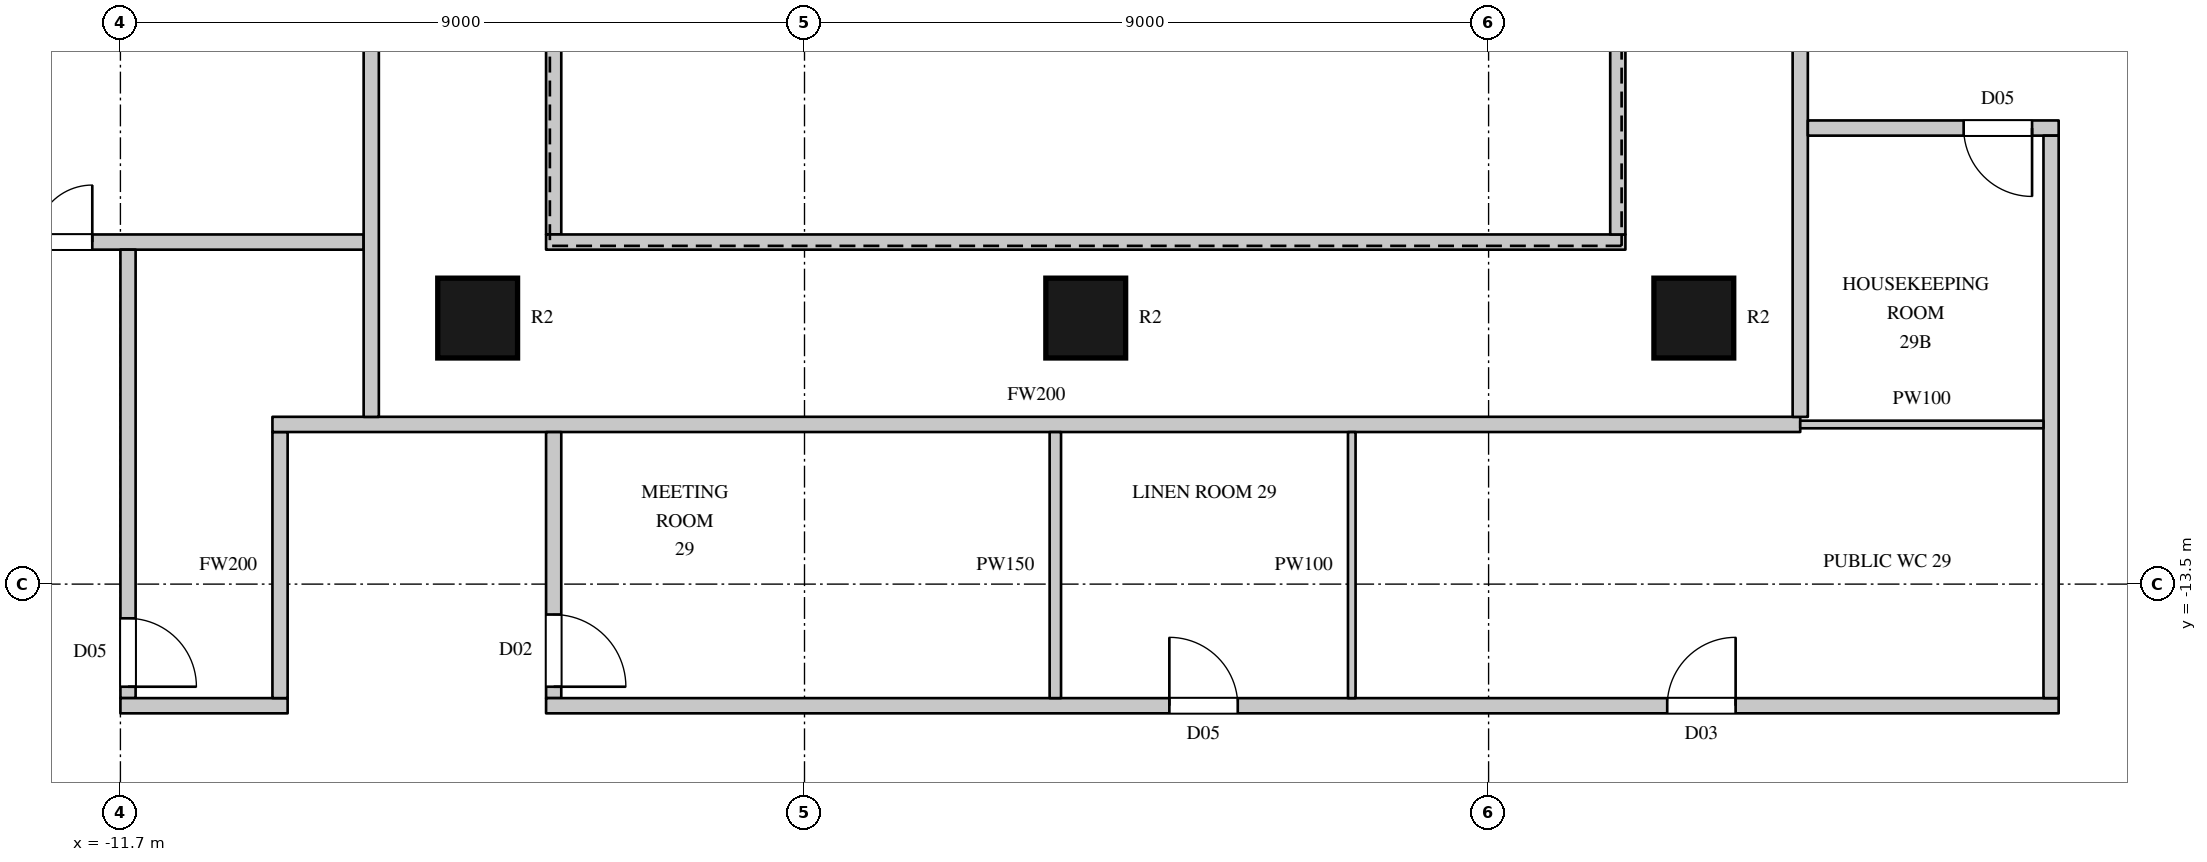
"""IFC4 building model, lengths in metres.
Left out: names, types, materials, properties, quantities, classifications, styles, units other than length and angle.
Written with IfcOpenShell. Run it as: python <this file> out.ifc"""

import sys

from ifc_helpers import new_model, si_unit, direction, frame, frame_2d, origin, origin_2d, place, context, subcontext, project, spatial, rectangle, circle, extrude, element, fill, save


model = new_model("IFC4")
c1 = context("Model", 3, precision=1e-05, world=origin(), true_north=direction((0.0, 1.0)))
c2 = subcontext(c1, "Body", "Model", "MODEL_VIEW")
j1 = project(units=[si_unit("LENGTHUNIT", "METRE"), si_unit("PLANEANGLEUNIT", "RADIAN")], contexts=[c1])
p1 = place(None, origin())
s1 = spatial("IfcSite", under=j1, at=p1, CompositionType="ELEMENT")
p2 = place(p1, origin())
s2 = spatial("IfcBuilding", under=s1, at=p2, CompositionType="ELEMENT")
p3 = place(p2, frame((0.0, 0.0, 134.7)))
s3 = spatial("IfcBuildingStorey", under=s2, at=p3, CompositionType="ELEMENT", Elevation=134.7)
for number, where, z_axis, x_axis in (
    (1, (-7.0, -10.0, 0.0), (0.0, 0.0, 1.0), (1.0, 0.0, 0.0)),
    (2, (1.0, -10.0, 0.0), (0.0, 0.0, 1.0), (1.0, 0.0, 0.0)),
    (3, (9.0, -10.0, 0.0), (0.0, 0.0, 1.0), (1.0, 0.0, 0.0)),
):
    element("IfcColumn", number, at=place(p3, frame(where, z_axis=z_axis, x_axis=x_axis)), inside=s3, PredefinedType="COLUMN", context=c2, shape_type="SweptSolid", body=[
        extrude(circle(Radius=0.525, at=origin_2d()), origin(), (0.0, 0.0, 1.0), 3.6),
    ])
p4 = place(p3, frame((-13.97, -9.0, 0.0), z_axis=(0.0, 0.0, 1.0), x_axis=(1.0, 0.0, 0.0)))
e4 = element("IfcWall", 4, at=p4, inside=s3, PredefinedType="PARTITIONING", context=c2, shape_type="SweptSolid", body=[
    extrude(rectangle(XDim=5.47, YDim=0.2, at=frame_2d((2.735, 0.0))), origin(), (0.0, 0.0, 1.0), 3.3),
])
p5 = place(p4, frame((0.4, 0.0, 0.0)))
e5 = element("IfcOpeningElement", 5, at=p5, cuts=e4, PredefinedType="OPENING", context=c2, shape_type="SweptSolid", body=[
    extrude(rectangle(XDim=1.5, YDim=2.2, at=frame_2d((0.75, 1.1))), frame((0.0, 0.11, 0.0), z_axis=(0.0, -1.0, 0.0), x_axis=(1.0, 0.0, 0.0)), (0.0, 0.0, 1.0), 0.22),
])
p6 = place(p3, frame((-11.6, -15.0, 0.0), z_axis=(0.0, 0.0, 1.0), x_axis=(0.0, 1.0, 0.0)))
e6 = element("IfcWall", 6, at=p6, inside=s3, PredefinedType="PARTITIONING", context=c2, shape_type="SweptSolid", body=[
    extrude(rectangle(XDim=5.9, YDim=0.2, at=frame_2d((2.95, 0.0))), origin(), (0.0, 0.0, 1.0), 2.6),
])
p7 = place(p6, frame((0.15, 0.0, 0.0)))
e7 = element("IfcOpeningElement", 7, at=p7, cuts=e6, PredefinedType="OPENING", context=c2, shape_type="SweptSolid", body=[
    extrude(rectangle(XDim=0.9, YDim=2.2, at=frame_2d((0.45, 1.1))), frame((0.0, 0.11, 0.0), z_axis=(0.0, -1.0, 0.0), x_axis=(1.0, 0.0, 0.0)), (0.0, 0.0, 1.0), 0.22),
])
p8 = place(p3, frame((-11.7, -15.1, 0.0), z_axis=(0.0, 0.0, 1.0), x_axis=(1.0, 0.0, 0.0)))
e8 = element("IfcWall", 8, at=p8, inside=s3, PredefinedType="PARTITIONING", context=c2, shape_type="SweptSolid", body=[
    extrude(rectangle(XDim=2.2, YDim=0.2, at=frame_2d((1.1, 0.0))), origin(), (0.0, 0.0, 1.0), 3.3),
])
p9 = place(p3, frame((-9.6, -15.0, 0.0), z_axis=(0.0, 0.0, 1.0), x_axis=(0.0, 1.0, 0.0)))
e9 = element("IfcWall", 9, at=p9, inside=s3, PredefinedType="PARTITIONING", context=c2, shape_type="SweptSolid", body=[
    extrude(rectangle(XDim=3.501, YDim=0.2, at=frame_2d((1.75, 0.0))), origin(), (0.0, 0.0, 1.0), 3.3),
])
p10 = place(p3, frame((-9.7, -11.399, 0.0), z_axis=(0.0, 0.0, 1.0), x_axis=(1.0, 0.0, 0.0)))
e10 = element("IfcWall", 10, at=p10, inside=s3, PredefinedType="PARTITIONING", context=c2, shape_type="SweptSolid", body=[
    extrude(rectangle(XDim=20.1, YDim=0.2, at=frame_2d((10.05, 0.0))), origin(), (0.0, 0.0, 1.0), 3.3),
])
p11 = place(p3, frame((-8.4, -11.3, 0.0), z_axis=(0.0, 0.0, 1.0), x_axis=(0.0, 1.0, 0.0)))
e11 = element("IfcWall", 11, at=p11, inside=s3, PredefinedType="PARTITIONING", context=c2, shape_type="SweptSolid", body=[
    extrude(rectangle(XDim=22.7, YDim=0.2, at=frame_2d((11.35, 0.0))), origin(), (0.0, 0.0, 1.0), 3.3),
])
p12 = place(p11, frame((15.05, 0.0, 0.0)))
e12 = element("IfcOpeningElement", 12, at=p12, cuts=e11, PredefinedType="OPENING", context=c2, shape_type="SweptSolid", body=[
    extrude(rectangle(XDim=1.5, YDim=2.2, at=frame_2d((0.75, 1.1))), frame((0.0, 0.11, 0.0), z_axis=(0.0, -1.0, 0.0), x_axis=(1.0, 0.0, 0.0)), (0.0, 0.0, 1.0), 0.22),
])
p13 = place(p3, frame((-6.0, -15.0, 0.0), z_axis=(0.0, 0.0, 1.0), x_axis=(0.0, 1.0, 0.0)))
e13 = element("IfcWall", 13, at=p13, inside=s3, PredefinedType="PARTITIONING", context=c2, shape_type="SweptSolid", body=[
    extrude(rectangle(XDim=3.5, YDim=0.2, at=frame_2d((1.75, 0.0))), origin(), (0.0, 0.0, 1.0), 3.3),
])
p14 = place(p13, frame((0.15, 0.0, 0.0)))
e14 = element("IfcOpeningElement", 14, at=p14, cuts=e13, PredefinedType="OPENING", context=c2, shape_type="SweptSolid", body=[
    extrude(rectangle(XDim=0.95, YDim=2.2, at=frame_2d((0.475, 1.1))), frame((0.0, 0.11, 0.0), z_axis=(0.0, -1.0, 0.0), x_axis=(1.0, 0.0, 0.0)), (0.0, 0.0, 1.0), 0.22),
])
p15 = place(p3, frame((-6.1, -15.1, 0.0), z_axis=(0.0, 0.0, 1.0), x_axis=(1.0, 0.0, 0.0)))
e15 = element("IfcWall", 15, at=p15, inside=s3, PredefinedType="PARTITIONING", context=c2, shape_type="SweptSolid", body=[
    extrude(rectangle(XDim=19.9, YDim=0.2, at=frame_2d((9.95, 0.0))), origin(), (0.0, 0.0, 1.0), 3.3),
])
p16 = place(p15, frame((8.2, 0.0, 0.0)))
e16 = element("IfcOpeningElement", 16, at=p16, cuts=e15, PredefinedType="OPENING", context=c2, shape_type="SweptSolid", body=[
    extrude(rectangle(XDim=0.9, YDim=2.2, at=frame_2d((0.45, 1.1))), frame((0.0, 0.11, 0.0), z_axis=(0.0, -1.0, 0.0), x_axis=(1.0, 0.0, 0.0)), (0.0, 0.0, 1.0), 0.22),
])
p17 = place(p15, frame((14.75, 0.0, 0.0)))
e17 = element("IfcOpeningElement", 17, at=p17, cuts=e15, PredefinedType="OPENING", context=c2, shape_type="SweptSolid", body=[
    extrude(rectangle(XDim=0.9, YDim=2.2, at=frame_2d((0.45, 1.1))), frame((0.0, 0.11, 0.0), z_axis=(0.0, -1.0, 0.0), x_axis=(1.0, 0.0, 0.0)), (0.0, 0.0, 1.0), 0.22),
])
p18 = place(p3, frame((-6.0, -8.9, 0.0), z_axis=(0.0, 0.0, 1.0), x_axis=(0.0, 1.0, 0.0)))
e18 = element("IfcWall", 18, at=p18, inside=s3, PredefinedType="PARTITIONING", context=c2, shape_type="SweptSolid", body=[
    extrude(rectangle(XDim=17.8, YDim=0.2, at=frame_2d((8.9, 0.0))), origin(), (0.0, 0.0, 1.0), 3.3),
])
p19 = place(p3, frame((-6.1, -9.0, 0.0), z_axis=(0.0, 0.0, 1.0), x_axis=(1.0, 0.0, 0.0)))
e19 = element("IfcWall", 19, at=p19, inside=s3, PredefinedType="PARTITIONING", context=c2, shape_type="SweptSolid", body=[
    extrude(rectangle(XDim=14.2, YDim=0.2, at=frame_2d((7.1, 0.0))), origin(), (0.0, 0.0, 1.0), 3.3),
])
p20 = place(p3, frame((8.0, -8.9, 0.0), z_axis=(0.0, 0.0, 1.0), x_axis=(0.0, 1.0, 0.0)))
e20 = element("IfcWall", 20, at=p20, inside=s3, PredefinedType="PARTITIONING", context=c2, shape_type="SweptSolid", body=[
    extrude(rectangle(XDim=17.8, YDim=0.2, at=frame_2d((8.9, 0.0))), origin(), (0.0, 0.0, 1.0), 3.3),
])
p21 = place(p3, frame((10.4, -11.3, 0.0), z_axis=(0.0, 0.0, 1.0), x_axis=(0.0, 1.0, 0.0)))
e21 = element("IfcWall", 21, at=p21, inside=s3, PredefinedType="PARTITIONING", context=c2, shape_type="SweptSolid", body=[
    extrude(rectangle(XDim=22.6, YDim=0.2, at=frame_2d((11.3, 0.0))), origin(), (0.0, 0.0, 1.0), 3.3),
])
p22 = place(p21, frame((16.3, 0.0, 0.0)))
e22 = element("IfcOpeningElement", 22, at=p22, cuts=e21, PredefinedType="OPENING", context=c2, shape_type="SweptSolid", body=[
    extrude(rectangle(XDim=1.5, YDim=2.2, at=frame_2d((0.75, 1.1))), frame((0.0, 0.11, 0.0), z_axis=(0.0, -1.0, 0.0), x_axis=(1.0, 0.0, 0.0)), (0.0, 0.0, 1.0), 0.22),
])
p23 = place(p21, frame((9.15, 0.0, 0.0)))
e23 = element("IfcOpeningElement", 23, at=p23, cuts=e21, PredefinedType="OPENING", context=c2, shape_type="SweptSolid", body=[
    extrude(rectangle(XDim=1.5, YDim=2.2, at=frame_2d((0.75, 1.1))), frame((0.0, 0.11, 0.0), z_axis=(0.0, -1.0, 0.0), x_axis=(1.0, 0.0, 0.0)), (0.0, 0.0, 1.0), 0.22),
])
p24 = place(p3, frame((10.5, -7.5, 0.0), z_axis=(0.0, 0.0, 1.0), x_axis=(1.0, 0.0, 0.0)))
e24 = element("IfcWall", 24, at=p24, inside=s3, PredefinedType="PARTITIONING", context=c2, shape_type="SweptSolid", body=[
    extrude(rectangle(XDim=3.3, YDim=0.2, at=frame_2d((1.65, 0.0))), origin(), (0.0, 0.0, 1.0), 3.3),
])
p25 = place(p24, frame((2.05, 0.0, 0.0)))
e25 = element("IfcOpeningElement", 25, at=p25, cuts=e24, PredefinedType="OPENING", context=c2, shape_type="SweptSolid", body=[
    extrude(rectangle(XDim=0.9, YDim=2.2, at=frame_2d((0.45, 1.1))), frame((0.0, 0.11, 0.0), z_axis=(0.0, -1.0, 0.0), x_axis=(1.0, 0.0, 0.0)), (0.0, 0.0, 1.0), 0.22),
])
p26 = place(p3, frame((13.7, -15.0, 0.0), z_axis=(0.0, 0.0, 1.0), x_axis=(0.0, 1.0, 0.0)))
e26 = element("IfcWall", 26, at=p26, inside=s3, PredefinedType="PARTITIONING", context=c2, shape_type="SweptSolid", body=[
    extrude(rectangle(XDim=7.4, YDim=0.2, at=frame_2d((3.7, 0.0))), origin(), (0.0, 0.0, 1.0), 3.3),
])
p27 = place(p3, frame((0.6, -15.0, 0.0), z_axis=(0.0, 0.0, 1.0), x_axis=(0.0, 1.0, 0.0)))
e27 = element("IfcWall", 27, at=p27, inside=s3, PredefinedType="PARTITIONING", context=c2, shape_type="SweptSolid", body=[
    extrude(rectangle(XDim=3.5, YDim=0.15, at=frame_2d((1.75, 0.0))), origin(), (0.0, 0.0, 1.0), 3.3),
])
p28 = place(p3, frame((4.5, -15.0, 0.0), z_axis=(0.0, 0.0, 1.0), x_axis=(0.0, 1.0, 0.0)))
e28 = element("IfcWall", 28, at=p28, inside=s3, PredefinedType="PARTITIONING", context=c2, shape_type="SweptSolid", body=[
    extrude(rectangle(XDim=3.5, YDim=0.1, at=frame_2d((1.75, 0.0))), origin(), (0.0, 0.0, 1.0), 3.3),
])
p29 = place(p3, frame((10.4, -11.4, 0.0), z_axis=(0.0, 0.0, 1.0), x_axis=(1.0, 0.0, 0.0)))
e29 = element("IfcWall", 29, at=p29, inside=s3, PredefinedType="PARTITIONING", context=c2, shape_type="SweptSolid", body=[
    extrude(rectangle(XDim=3.2, YDim=0.1, at=frame_2d((1.6, 0.0))), origin(), (0.0, 0.0, 1.0), 3.3),
])
p30 = place(p5, origin())
e30 = element("IfcDoor", 30, at=p30, inside=s3, OperationType="DOUBLE_DOOR_SINGLE_SWING", PredefinedType="DOOR", context=c2, shape_type="SweptSolid", body=[
    extrude(rectangle(XDim=1.5, YDim=2.2, at=frame_2d((0.75, 1.1))), frame((0.0, 0.025, 0.0), z_axis=(0.0, -1.0, 0.0), x_axis=(1.0, 0.0, 0.0)), (0.0, 0.0, 1.0), 0.05),
])
fill(e5, e30)
p31 = place(p7, origin())
e31 = element("IfcDoor", 31, at=p31, inside=s3, OperationType="SINGLE_SWING_RIGHT", PredefinedType="DOOR", context=c2, shape_type="SweptSolid", body=[
    extrude(rectangle(XDim=0.9, YDim=2.2, at=frame_2d((0.45, 1.1))), frame((0.0, 0.025, 0.0), z_axis=(0.0, -1.0, 0.0), x_axis=(1.0, 0.0, 0.0)), (0.0, 0.0, 1.0), 0.05),
])
fill(e7, e31)
p32 = place(p14, origin())
e32 = element("IfcDoor", 32, at=p32, inside=s3, OperationType="SINGLE_SWING_RIGHT", PredefinedType="DOOR", context=c2, shape_type="SweptSolid", body=[
    extrude(rectangle(XDim=0.95, YDim=2.2, at=frame_2d((0.475, 1.1))), frame((0.0, 0.025, 0.0), z_axis=(0.0, -1.0, 0.0), x_axis=(1.0, 0.0, 0.0)), (0.0, 0.0, 1.0), 0.05),
])
fill(e14, e32)
p33 = place(p16, origin())
e33 = element("IfcDoor", 33, at=p33, inside=s3, OperationType="SINGLE_SWING_LEFT", PredefinedType="DOOR", context=c2, shape_type="SweptSolid", body=[
    extrude(rectangle(XDim=0.9, YDim=2.2, at=frame_2d((0.45, 1.1))), frame((0.0, 0.025, 0.0), z_axis=(0.0, -1.0, 0.0), x_axis=(1.0, 0.0, 0.0)), (0.0, 0.0, 1.0), 0.05),
])
fill(e16, e33)
p34 = place(p17, origin())
e34 = element("IfcDoor", 34, at=p34, inside=s3, OperationType="SINGLE_SWING_RIGHT", PredefinedType="DOOR", context=c2, shape_type="SweptSolid", body=[
    extrude(rectangle(XDim=0.9, YDim=2.2, at=frame_2d((0.45, 1.1))), frame((0.0, 0.025, 0.0), z_axis=(0.0, -1.0, 0.0), x_axis=(1.0, 0.0, 0.0)), (0.0, 0.0, 1.0), 0.05),
])
fill(e17, e34)
p35 = place(p25, origin())
e35 = element("IfcDoor", 35, at=p35, inside=s3, OperationType="SINGLE_SWING_LEFT", PredefinedType="DOOR", context=c2, shape_type="SweptSolid", body=[
    extrude(rectangle(XDim=0.9, YDim=2.2, at=frame_2d((0.45, 1.1))), frame((0.0, 0.025, 0.0), z_axis=(0.0, -1.0, 0.0), x_axis=(1.0, 0.0, 0.0)), (0.0, 0.0, 1.0), 0.05),
])
fill(e25, e35)
save(model, sys.argv[1])
